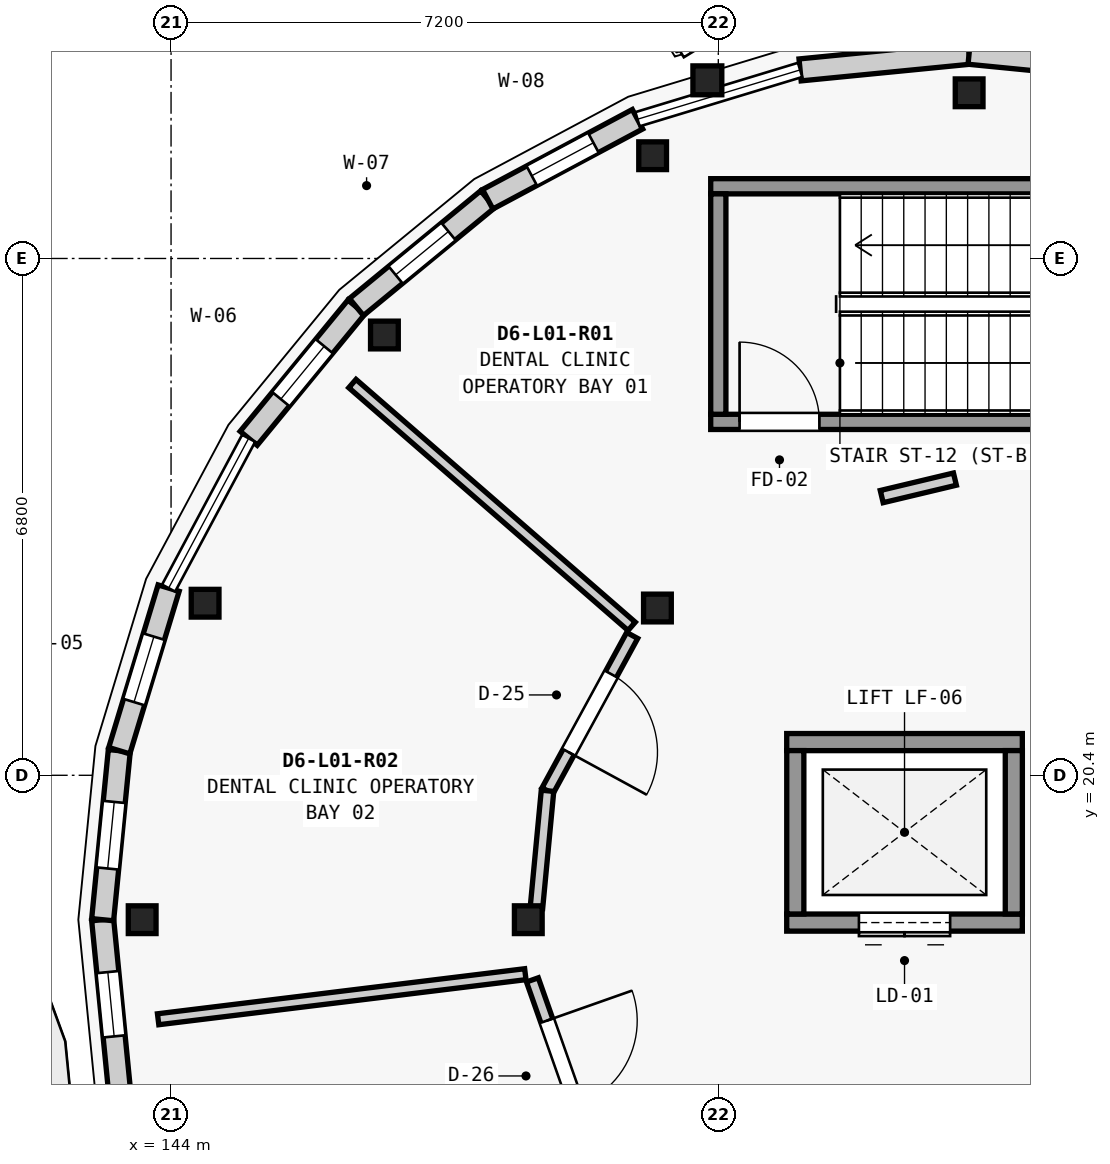
"""IFC4 building model, lengths in metres.
Left out: names, types, materials, properties, quantities, classifications, styles, units other than length and angle.
Written with IfcOpenShell. Run it as: python <this file> out.ifc"""

import sys

from ifc_helpers import new_model, si_unit, direction, frame, frame_2d, origin, origin_2d, place, context, subcontext, project, spatial, rectangle, circle, extrude, element, fill, save


model = new_model("IFC4")
c1 = context("Model", 3, precision=1e-05, world=origin(), true_north=direction((0.0, 1.0)))
c2 = subcontext(c1, "Body", "Model", "MODEL_VIEW")
j1 = project(units=[si_unit("LENGTHUNIT", "METRE"), si_unit("PLANEANGLEUNIT", "RADIAN")], contexts=[c1])
p1 = place(None, origin())
s1 = spatial("IfcSite", under=j1, at=p1, CompositionType="ELEMENT")
p2 = place(p1, origin())
s2 = spatial("IfcBuilding", under=s1, at=p2, CompositionType="ELEMENT")
p3 = place(p2, frame((0.0, 0.0, 4.55)))
s3 = spatial("IfcBuildingStorey", under=s2, at=p3, CompositionType="ELEMENT", Elevation=4.55)
for number, where, z_axis, x_axis in (
    (1, (154.5, 29.38, 0.0), (0.0, 0.0, 1.0), (1.0, 0.0, 0.0)),
    (2, (150.336, 28.552, 0.0), (0.0, 0.0, 1.0), (1.0, 0.0, 0.0)),
    (3, (146.807, 26.193, 0.0), (0.0, 0.0, 1.0), (1.0, 0.0, 0.0)),
    (4, (144.448, 22.664, 0.0), (0.0, 0.0, 1.0), (1.0, 0.0, 0.0)),
    (5, (143.62, 18.5, 0.0), (0.0, 0.0, 1.0), (1.0, 0.0, 0.0)),
    (6, (150.399, 22.601, 0.0), (0.0, 0.0, 1.0), (1.0, 0.0, 0.0)),
    (7, (148.7, 18.5, 0.0), (0.0, 0.0, 1.0), (1.0, 0.0, 0.0)),
):
    element("IfcColumn", number, at=place(p3, frame(where, z_axis=z_axis, x_axis=x_axis)), inside=s3, PredefinedType="COLUMN", context=c2, shape_type="SweptSolid", body=[
        extrude(rectangle(XDim=0.365, YDim=0.365, at=origin_2d()), origin(), (0.0, 0.0, 1.0), 4.2),
    ])
p4 = place(p3, frame((151.056, 29.544, 0.0), z_axis=(0.0, 0.0, 1.0), x_axis=(1.0, 0.0, 0.0)))
e8 = element("IfcColumn", 8, at=p4, inside=s3, PredefinedType="PILASTER", context=c2, shape_type="SweptSolid", body=[
    extrude(circle(Radius=0.19, at=origin_2d()), origin(), (0.0, 0.0, 1.0), 4.2),
])
p5 = place(p3, frame((143.319, 16.276, 0.0), z_axis=(0.0, 0.0, 1.0), x_axis=(-0.097989369151, 0.995187461503, 0.0)))
e9 = element("IfcWall", 9, at=p5, inside=s3, PredefinedType="ELEMENTEDWALL", context=c2, shape_type="SweptSolid", body=[
    extrude(rectangle(XDim=2.235, YDim=0.29, at=frame_2d((1.117, 0.0))), origin(), (0.0, 0.0, 1.0), 3.309),
])
p6 = place(p5, frame((0.692, 0.0, 0.85)))
e10 = element("IfcOpeningElement", 10, at=p6, cuts=e9, PredefinedType="OPENING", context=c2, shape_type="SweptSolid", body=[
    extrude(rectangle(XDim=0.85, YDim=1.75, at=frame_2d((0.425, 0.875))), frame((0.0, 0.155, 0.0), z_axis=(0.0, -1.0, 0.0), x_axis=(1.0, 0.0, 0.0)), (0.0, 0.0, 1.0), 0.31),
])
p7 = place(p3, frame((143.1, 18.5, 0.0), z_axis=(0.0, 0.0, 1.0), x_axis=(0.097989369151, 0.995187461503, 0.0)))
e11 = element("IfcWall", 11, at=p7, inside=s3, PredefinedType="ELEMENTEDWALL", context=c2, shape_type="SweptSolid", body=[
    extrude(rectangle(XDim=2.235, YDim=0.29, at=frame_2d((1.117, 0.0))), origin(), (0.0, 0.0, 1.0), 3.309),
])
p8 = place(p7, frame((0.677, 0.0, 0.85)))
e12 = element("IfcOpeningElement", 12, at=p8, cuts=e11, PredefinedType="OPENING", context=c2, shape_type="SweptSolid", body=[
    extrude(rectangle(XDim=0.88, YDim=1.6, at=frame_2d((0.44, 0.8))), frame((0.0, 0.155, 0.0), z_axis=(0.0, -1.0, 0.0), x_axis=(1.0, 0.0, 0.0)), (0.0, 0.0, 1.0), 0.31),
])
p9 = place(p3, frame((143.319, 20.724, 0.0), z_axis=(0.0, 0.0, 1.0), x_axis=(0.290322655883, 0.956928814218, 0.0)))
e13 = element("IfcWall", 13, at=p9, inside=s3, PredefinedType="ELEMENTEDWALL", context=c2, shape_type="SweptSolid", body=[
    extrude(rectangle(XDim=2.235, YDim=0.29, at=frame_2d((1.118, 0.0))), origin(), (0.0, 0.0, 1.0), 3.309),
])
p10 = place(p9, frame((0.668, 0.0, 0.85)))
e14 = element("IfcOpeningElement", 14, at=p10, cuts=e13, PredefinedType="OPENING", context=c2, shape_type="SweptSolid", body=[
    extrude(rectangle(XDim=0.9, YDim=1.4, at=frame_2d((0.45, 0.7))), frame((0.0, 0.155, 0.0), z_axis=(0.0, -1.0, 0.0), x_axis=(1.0, 0.0, 0.0)), (0.0, 0.0, 1.0), 0.31),
])
p11 = place(p3, frame((145.021, 24.834, 0.0), z_axis=(0.0, 0.0, 1.0), x_axis=(0.63455767339, 0.772875513354, 0.0)))
e15 = element("IfcWall", 15, at=p11, inside=s3, PredefinedType="ELEMENTEDWALL", context=c2, shape_type="SweptSolid", body=[
    extrude(rectangle(XDim=2.235, YDim=0.29, at=frame_2d((1.117, 0.0))), origin(), (0.0, 0.0, 1.0), 3.309),
])
p12 = place(p11, frame((0.667, 0.0, 0.85)))
e16 = element("IfcOpeningElement", 16, at=p12, cuts=e15, PredefinedType="OPENING", context=c2, shape_type="SweptSolid", body=[
    extrude(rectangle(XDim=0.9, YDim=1.65, at=frame_2d((0.45, 0.825))), frame((0.0, 0.155, 0.0), z_axis=(0.0, -1.0, 0.0), x_axis=(1.0, 0.0, 0.0)), (0.0, 0.0, 1.0), 0.31),
])
p13 = place(p3, frame((146.439, 26.561, 0.0), z_axis=(0.0, 0.0, 1.0), x_axis=(0.772875513354, 0.63455767339, 0.0)))
e17 = element("IfcWall", 17, at=p13, inside=s3, PredefinedType="ELEMENTEDWALL", context=c2, shape_type="SweptSolid", body=[
    extrude(rectangle(XDim=2.235, YDim=0.29, at=frame_2d((1.117, 0.0))), origin(), (0.0, 0.0, 1.0), 3.309),
])
p14 = place(p13, frame((0.667, 0.0, 0.85)))
e18 = element("IfcOpeningElement", 18, at=p14, cuts=e17, PredefinedType="OPENING", context=c2, shape_type="SweptSolid", body=[
    extrude(rectangle(XDim=0.9, YDim=1.9, at=frame_2d((0.45, 0.95))), frame((0.0, 0.155, 0.0), z_axis=(0.0, -1.0, 0.0), x_axis=(1.0, 0.0, 0.0)), (0.0, 0.0, 1.0), 0.31),
])
p15 = place(p3, frame((148.166, 27.979, 0.0), z_axis=(0.0, 0.0, 1.0), x_axis=(0.882017012185, 0.471217561446, 0.0)))
e19 = element("IfcWall", 19, at=p15, inside=s3, PredefinedType="ELEMENTEDWALL", context=c2, shape_type="SweptSolid", body=[
    extrude(rectangle(XDim=2.235, YDim=0.29, at=frame_2d((1.117, 0.0))), origin(), (0.0, 0.0, 1.0), 3.309),
])
p16 = place(p15, frame((0.657, 0.0, 0.85)))
e20 = element("IfcOpeningElement", 20, at=p16, cuts=e19, PredefinedType="OPENING", context=c2, shape_type="SweptSolid", body=[
    extrude(rectangle(XDim=0.92, YDim=1.55, at=frame_2d((0.46, 0.775))), frame((0.0, 0.155, 0.0), z_axis=(0.0, -1.0, 0.0), x_axis=(1.0, 0.0, 0.0)), (0.0, 0.0, 1.0), 0.31),
])
for number, where, z_axis, x_axis in (
    (21, (152.276, 29.681, 0.0), (0.0, 0.0, 1.0), (0.995, 0.098, 0.0)),
    (22, (154.5, 29.9, 0.0), (0.0, 0.0, 1.0), (0.995, -0.098, 0.0)),
):
    element("IfcWall", number, at=place(p3, frame(where, z_axis=z_axis, x_axis=x_axis)), inside=s3, PredefinedType="ELEMENTEDWALL", context=c2, shape_type="SweptSolid", body=[
        extrude(rectangle(XDim=2.235, YDim=0.29, at=frame_2d((1.117, 0.0))), origin(), (0.0, 0.0, 1.0), 3.309),
    ])
p17 = place(p3, frame((151.1, 25.05, 0.0), z_axis=(0.0, 0.0, 1.0), x_axis=(1.0, 0.0, 0.0)))
e23 = element("IfcWall", 23, at=p17, inside=s3, PredefinedType="SHEAR", context=c2, shape_type="SweptSolid", body=[
    extrude(rectangle(XDim=6.8, YDim=0.2, at=frame_2d((3.4, 0.0))), origin(), (0.0, 0.0, 1.0), 3.955),
])
p18 = place(p17, frame((0.38, 0.0, 0.0)))
e24 = element("IfcOpeningElement", 24, at=p18, cuts=e23, PredefinedType="OPENING", context=c2, shape_type="SweptSolid", body=[
    extrude(rectangle(XDim=1.05, YDim=2.15, at=frame_2d((0.525, 1.075))), frame((0.0, 0.11, 0.0), z_axis=(0.0, -1.0, 0.0), x_axis=(1.0, 0.0, 0.0)), (0.0, 0.0, 1.0), 0.22),
])
p19 = place(p3, frame((151.1, 28.15, 0.0), z_axis=(0.0, 0.0, 1.0), x_axis=(1.0, 0.0, 0.0)))
e25 = element("IfcWall", 25, at=p19, inside=s3, PredefinedType="SHEAR", context=c2, shape_type="SweptSolid", body=[
    extrude(rectangle(XDim=6.8, YDim=0.2, at=frame_2d((3.4, 0.0))), origin(), (0.0, 0.0, 1.0), 3.955),
])
p20 = place(p3, frame((151.2, 25.15, 0.0), z_axis=(0.0, 0.0, 1.0), x_axis=(0.0, 1.0, 0.0)))
e26 = element("IfcWall", 26, at=p20, inside=s3, PredefinedType="SHEAR", context=c2, shape_type="SweptSolid", body=[
    extrude(rectangle(XDim=2.9, YDim=0.2, at=frame_2d((1.45, 0.0))), origin(), (0.0, 0.0, 1.0), 3.955),
])
p21 = place(p3, frame((152.1, 18.462, 0.0), z_axis=(0.0, 0.0, 1.0), x_axis=(1.0, 0.0, 0.0)))
e27 = element("IfcWall", 27, at=p21, inside=s3, PredefinedType="SHEAR", context=c2, shape_type="SweptSolid", body=[
    extrude(rectangle(XDim=3.1, YDim=0.225, at=frame_2d((1.55, 0.0))), origin(), (0.0, 0.0, 1.0), 3.955),
])
p22 = place(p21, frame((0.95, 0.0, 0.0)))
e28 = element("IfcOpeningElement", 28, at=p22, cuts=e27, PredefinedType="OPENING", context=c2, shape_type="SweptSolid", body=[
    extrude(rectangle(XDim=1.2, YDim=2.2, at=frame_2d((0.6, 1.1))), frame((0.0, 0.123, 0.0), z_axis=(0.0, -1.0, 0.0), x_axis=(1.0, 0.0, 0.0)), (0.0, 0.0, 1.0), 0.245),
])
p23 = place(p3, frame((152.1, 20.837, 0.0), z_axis=(0.0, 0.0, 1.0), x_axis=(1.0, 0.0, 0.0)))
e29 = element("IfcWall", 29, at=p23, inside=s3, PredefinedType="SHEAR", context=c2, shape_type="SweptSolid", body=[
    extrude(rectangle(XDim=3.1, YDim=0.225, at=frame_2d((1.55, 0.0))), origin(), (0.0, 0.0, 1.0), 3.955),
])
for number, where, z_axis, x_axis in (
    (30, (152.213, 18.575, 0.0), (0.0, 0.0, 1.0), (0.0, 1.0, 0.0)),
    (31, (155.088, 18.575, 0.0), (0.0, 0.0, 1.0), (0.0, 1.0, 0.0)),
):
    element("IfcWall", number, at=place(p3, frame(where, z_axis=z_axis, x_axis=x_axis)), inside=s3, PredefinedType="SHEAR", context=c2, shape_type="SweptSolid", body=[
        extrude(rectangle(XDim=2.15, YDim=0.225, at=frame_2d((1.075, 0.0))), origin(), (0.0, 0.0, 1.0), 3.955),
    ])
p24 = place(p3, frame((150.06, 22.36, 0.0), z_axis=(0.0, 0.0, 1.0), x_axis=(-0.754707000712, 0.656061996366, 0.0)))
e32 = element("IfcWall", 32, at=p24, inside=s3, PredefinedType="PARTITIONING", context=c2, shape_type="SweptSolid", body=[
    extrude(rectangle(XDim=4.868, YDim=0.145, at=frame_2d((2.434, 0.0))), origin(), (0.0, 0.0, 1.0), 3.284),
])
p25 = place(p3, frame((148.661, 17.783, 0.0), z_axis=(0.0, 0.0, 1.0), x_axis=(-0.992549416304, -0.121842751918, 0.0)))
e33 = element("IfcWall", 33, at=p25, inside=s3, PredefinedType="PARTITIONING", context=c2, shape_type="SweptSolid", body=[
    extrude(rectangle(XDim=4.867, YDim=0.145, at=frame_2d((2.434, 0.0))), origin(), (0.0, 0.0, 1.0), 3.284),
])
p26 = place(p3, frame((154.313, 24.297, 0.0), z_axis=(0.0, 0.0, 1.0), x_axis=(-0.972586166784, -0.232542787849, 0.0)))
e34 = element("IfcWall", 34, at=p26, inside=s3, PredefinedType="PARTITIONING", context=c2, shape_type="SweptSolid", body=[
    extrude(rectangle(XDim=0.99, YDim=0.165, at=frame_2d((0.495, 0.0))), origin(), (0.0, 0.0, 1.0), 3.284),
])
p27 = place(p3, frame((150.067, 22.24, 0.0), z_axis=(0.0, 0.0, 1.0), x_axis=(-0.478565523384, -0.878051843474, 0.0)))
e35 = element("IfcWall", 35, at=p27, inside=s3, PredefinedType="PARTITIONING", context=c2, shape_type="SweptSolid", body=[
    extrude(rectangle(XDim=2.328, YDim=0.165, at=frame_2d((1.164, 0.0))), origin(), (0.0, 0.0, 1.0), 3.284),
])
p28 = place(p27, frame((0.579, 0.0, 0.0)))
e36 = element("IfcOpeningElement", 36, at=p28, cuts=e35, PredefinedType="OPENING", context=c2, shape_type="SweptSolid", body=[
    extrude(rectangle(XDim=1.17, YDim=2.24, at=frame_2d((0.585, 1.12))), frame((0.0, 0.093, 0.0), z_axis=(0.0, -1.0, 0.0), x_axis=(1.0, 0.0, 0.0)), (0.0, 0.0, 1.0), 0.185),
])
p29 = place(p3, frame((148.953, 20.196, 0.0), z_axis=(0.0, 0.0, 1.0), x_axis=(-0.094258636882, -0.995547743392, 0.0)))
e37 = element("IfcWall", 37, at=p29, inside=s3, PredefinedType="PARTITIONING", context=c2, shape_type="SweptSolid", body=[
    extrude(rectangle(XDim=1.549, YDim=0.165, at=frame_2d((0.774, 0.0))), origin(), (0.0, 0.0, 1.0), 3.284),
])
p30 = place(p3, frame((148.754, 17.708, 0.0), z_axis=(0.0, 0.0, 1.0), x_axis=(0.332606133603, -0.943065830093, 0.0)))
e38 = element("IfcWall", 38, at=p30, inside=s3, PredefinedType="PARTITIONING", context=c2, shape_type="SweptSolid", body=[
    extrude(rectangle(XDim=2.328, YDim=0.165, at=frame_2d((1.164, 0.0))), origin(), (0.0, 0.0, 1.0), 3.284),
])
p31 = place(p30, frame((0.569, 0.0, 0.0)))
e39 = element("IfcOpeningElement", 39, at=p31, cuts=e38, PredefinedType="OPENING", context=c2, shape_type="SweptSolid", body=[
    extrude(rectangle(XDim=1.19, YDim=2.26, at=frame_2d((0.595, 1.13))), frame((0.0, 0.093, 0.0), z_axis=(0.0, -1.0, 0.0), x_axis=(1.0, 0.0, 0.0)), (0.0, 0.0, 1.0), 0.185),
])
p32 = place(p6, origin())
e40 = element("IfcWindow", 40, at=p32, inside=s3, PartitioningType="SINGLE_PANEL", PredefinedType="WINDOW", context=c2, shape_type="SweptSolid", body=[
    extrude(rectangle(XDim=0.85, YDim=1.75, at=frame_2d((0.425, 0.875))), frame((0.0, 0.03, 0.0), z_axis=(0.0, -1.0, 0.0), x_axis=(1.0, 0.0, 0.0)), (0.0, 0.0, 1.0), 0.06),
])
fill(e10, e40)
p33 = place(p8, origin())
e41 = element("IfcWindow", 41, at=p33, inside=s3, PartitioningType="SINGLE_PANEL", PredefinedType="WINDOW", context=c2, shape_type="SweptSolid", body=[
    extrude(rectangle(XDim=0.88, YDim=1.6, at=frame_2d((0.44, 0.8))), frame((0.0, 0.03, 0.0), z_axis=(0.0, -1.0, 0.0), x_axis=(1.0, 0.0, 0.0)), (0.0, 0.0, 1.0), 0.06),
])
fill(e12, e41)
p34 = place(p10, origin())
e42 = element("IfcWindow", 42, at=p34, inside=s3, PartitioningType="SINGLE_PANEL", PredefinedType="WINDOW", context=c2, shape_type="SweptSolid", body=[
    extrude(rectangle(XDim=0.9, YDim=1.4, at=frame_2d((0.45, 0.7))), frame((0.0, 0.03, 0.0), z_axis=(0.0, -1.0, 0.0), x_axis=(1.0, 0.0, 0.0)), (0.0, 0.0, 1.0), 0.06),
])
fill(e14, e42)
p35 = place(p12, origin())
e43 = element("IfcWindow", 43, at=p35, inside=s3, PartitioningType="SINGLE_PANEL", PredefinedType="WINDOW", context=c2, shape_type="SweptSolid", body=[
    extrude(rectangle(XDim=0.9, YDim=1.65, at=frame_2d((0.45, 0.825))), frame((0.0, 0.03, 0.0), z_axis=(0.0, -1.0, 0.0), x_axis=(1.0, 0.0, 0.0)), (0.0, 0.0, 1.0), 0.06),
])
fill(e16, e43)
p36 = place(p14, origin())
e44 = element("IfcWindow", 44, at=p36, inside=s3, PartitioningType="SINGLE_PANEL", PredefinedType="WINDOW", context=c2, shape_type="SweptSolid", body=[
    extrude(rectangle(XDim=0.9, YDim=1.9, at=frame_2d((0.45, 0.95))), frame((0.0, 0.03, 0.0), z_axis=(0.0, -1.0, 0.0), x_axis=(1.0, 0.0, 0.0)), (0.0, 0.0, 1.0), 0.06),
])
fill(e18, e44)
p37 = place(p16, origin())
e45 = element("IfcWindow", 45, at=p37, inside=s3, PartitioningType="SINGLE_PANEL", PredefinedType="WINDOW", context=c2, shape_type="SweptSolid", body=[
    extrude(rectangle(XDim=0.92, YDim=1.55, at=frame_2d((0.46, 0.775))), frame((0.0, 0.03, 0.0), z_axis=(0.0, -1.0, 0.0), x_axis=(1.0, 0.0, 0.0)), (0.0, 0.0, 1.0), 0.06),
])
fill(e20, e45)
p38 = place(p18, origin())
e46 = element("IfcDoor", 46, at=p38, inside=s3, OperationType="SINGLE_SWING_LEFT", PredefinedType="DOOR", context=c2, shape_type="SweptSolid", body=[
    extrude(rectangle(XDim=1.05, YDim=2.15, at=frame_2d((0.525, 1.075))), frame((0.0, 0.025, 0.0), z_axis=(0.0, -1.0, 0.0), x_axis=(1.0, 0.0, 0.0)), (0.0, 0.0, 1.0), 0.05),
])
fill(e24, e46)
p39 = place(p22, origin())
e47 = element("IfcDoor", 47, at=p39, inside=s3, OperationType="DOUBLE_DOOR_SLIDING", PredefinedType="DOOR", context=c2, shape_type="SweptSolid", body=[
    extrude(rectangle(XDim=1.2, YDim=2.2, at=frame_2d((0.6, 1.1))), frame((0.0, 0.025, 0.0), z_axis=(0.0, -1.0, 0.0), x_axis=(1.0, 0.0, 0.0)), (0.0, 0.0, 1.0), 0.05),
])
fill(e28, e47)
p40 = place(p28, origin())
e48 = element("IfcDoor", 48, at=p40, inside=s3, OperationType="SINGLE_SWING_RIGHT", PredefinedType="DOOR", context=c2, shape_type="SweptSolid", body=[
    extrude(rectangle(XDim=1.17, YDim=2.24, at=frame_2d((0.585, 1.12))), frame((0.0, 0.025, 0.0), z_axis=(0.0, -1.0, 0.0), x_axis=(1.0, 0.0, 0.0)), (0.0, 0.0, 1.0), 0.05),
])
fill(e36, e48)
p41 = place(p31, origin())
e49 = element("IfcDoor", 49, at=p41, inside=s3, OperationType="SINGLE_SWING_LEFT", PredefinedType="DOOR", context=c2, shape_type="SweptSolid", body=[
    extrude(rectangle(XDim=1.19, YDim=2.26, at=frame_2d((0.595, 1.13))), frame((0.0, 0.025, 0.0), z_axis=(0.0, -1.0, 0.0), x_axis=(1.0, 0.0, 0.0)), (0.0, 0.0, 1.0), 0.05),
])
fill(e39, e49)
save(model, sys.argv[1])
